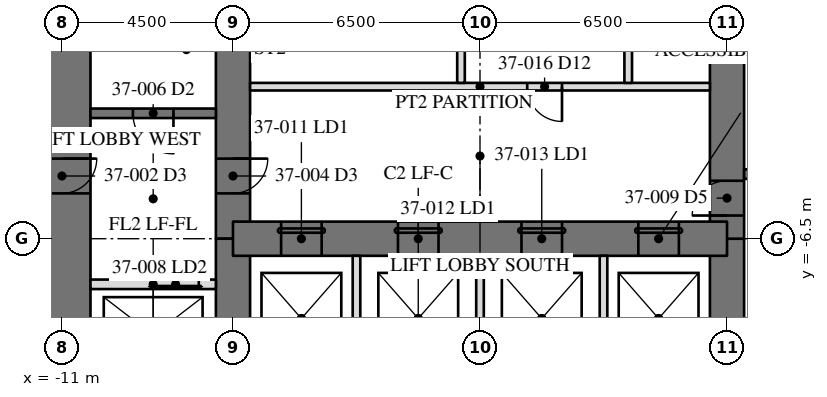
"""IFC4 building model, lengths in metres.
Left out: names, types, materials, properties, quantities, classifications, styles, units other than length and angle.
Written with IfcOpenShell. Run it as: python <this file> out.ifc"""

import sys

from ifc_helpers import new_model, si_unit, direction, frame, frame_2d, origin, place, context, subcontext, project, spatial, rectangle, extrude, element, fill, save


model = new_model("IFC4")
c1 = context("Model", 3, precision=1e-05, world=origin(), true_north=direction((0.0, 1.0)))
c2 = subcontext(c1, "Body", "Model", "MODEL_VIEW")
j1 = project(units=[si_unit("LENGTHUNIT", "METRE"), si_unit("PLANEANGLEUNIT", "RADIAN")], contexts=[c1])
p1 = place(None, origin())
s1 = spatial("IfcSite", under=j1, at=p1, CompositionType="ELEMENT")
p2 = place(p1, origin())
s2 = spatial("IfcBuilding", under=s1, at=p2, CompositionType="ELEMENT")
p3 = place(p2, frame((0.0, 0.0, 158.2)))
s3 = spatial("IfcBuildingStorey", under=s2, at=p3, CompositionType="ELEMENT", Elevation=158.2)
p4 = place(p3, frame((-11.0, 11.0, 0.0), z_axis=(0.0, 0.0, 1.0), x_axis=(0.0, -1.0, 0.0)))
e1 = element("IfcWall", 1, at=p4, inside=s3, PredefinedType="SHEAR", context=c2, shape_type="SweptSolid", body=[
    extrude(rectangle(XDim=22.0, YDim=1.5, at=frame_2d((11.0, 0.0))), origin(), (0.0, 0.0, 1.0), 4.1),
])
p5 = place(p4, frame((15.393, 0.0, 0.0)))
e2 = element("IfcOpeningElement", 2, at=p5, cuts=e1, PredefinedType="OPENING", context=c2, shape_type="SweptSolid", body=[
    extrude(rectangle(XDim=0.915, YDim=2.134, at=frame_2d((0.458, 1.067))), frame((0.0, 0.76, 0.0), z_axis=(0.0, -1.0, 0.0), x_axis=(1.0, 0.0, 0.0)), (0.0, 0.0, 1.0), 1.52),
])
p6 = place(p3, frame((6.5, -11.0, 0.0), z_axis=(0.0, 0.0, 1.0), x_axis=(0.0, 1.0, 0.0)))
e3 = element("IfcWall", 3, at=p6, inside=s3, PredefinedType="SHEAR", context=c2, shape_type="SweptSolid", body=[
    extrude(rectangle(XDim=4.5, YDim=0.9, at=frame_2d((2.25, 0.0))), origin(), (0.0, 0.0, 1.0), 4.1),
])
p7 = place(p3, frame((6.5, -6.5, 0.0), z_axis=(0.0, 0.0, 1.0), x_axis=(0.0, 1.0, 0.0)))
e4 = element("IfcWall", 4, at=p7, inside=s3, PredefinedType="SHEAR", context=c2, shape_type="SweptSolid", body=[
    extrude(rectangle(XDim=13.0, YDim=0.9, at=frame_2d((6.5, 0.0))), origin(), (0.0, 0.0, 1.0), 4.1),
])
p8 = place(p7, frame((10.893, 0.0, 0.0)))
e5 = element("IfcOpeningElement", 5, at=p8, cuts=e4, PredefinedType="OPENING", context=c2, shape_type="SweptSolid", body=[
    extrude(rectangle(XDim=0.915, YDim=2.134, at=frame_2d((0.458, 1.067))), frame((0.0, 0.46, 0.0), z_axis=(0.0, -1.0, 0.0), x_axis=(1.0, 0.0, 0.0)), (0.0, 0.0, 1.0), 0.92),
])
p9 = place(p7, frame((0.61, 0.0, 0.0)))
e6 = element("IfcOpeningElement", 6, at=p9, cuts=e4, PredefinedType="OPENING", context=c2, shape_type="SweptSolid", body=[
    extrude(rectangle(XDim=0.915, YDim=2.134, at=frame_2d((0.458, 1.067))), frame((0.0, 0.46, 0.0), z_axis=(0.0, -1.0, 0.0), x_axis=(1.0, 0.0, 0.0)), (0.0, 0.0, 1.0), 0.92),
])
p10 = place(p3, frame((-6.5, 6.5, 0.0), z_axis=(0.0, 0.0, 1.0), x_axis=(0.0, -1.0, 0.0)))
e7 = element("IfcWall", 7, at=p10, inside=s3, PredefinedType="SHEAR", context=c2, shape_type="SweptSolid", body=[
    extrude(rectangle(XDim=13.0, YDim=0.9, at=frame_2d((6.5, 0.0))), origin(), (0.0, 0.0, 1.0), 4.1),
])
p11 = place(p10, frame((10.893, 0.0, 0.0)))
e8 = element("IfcOpeningElement", 8, at=p11, cuts=e7, PredefinedType="OPENING", context=c2, shape_type="SweptSolid", body=[
    extrude(rectangle(XDim=0.915, YDim=2.134, at=frame_2d((0.458, 1.067))), frame((0.0, 0.46, 0.0), z_axis=(0.0, -1.0, 0.0), x_axis=(1.0, 0.0, 0.0)), (0.0, 0.0, 1.0), 0.92),
])
p12 = place(p10, frame((0.61, 0.0, 0.0)))
e9 = element("IfcOpeningElement", 9, at=p12, cuts=e7, PredefinedType="OPENING", context=c2, shape_type="SweptSolid", body=[
    extrude(rectangle(XDim=0.915, YDim=2.134, at=frame_2d((0.458, 1.067))), frame((0.0, 0.46, 0.0), z_axis=(0.0, -1.0, 0.0), x_axis=(1.0, 0.0, 0.0)), (0.0, 0.0, 1.0), 0.92),
])
p13 = place(p3, frame((-6.5, -6.5, 0.0), z_axis=(0.0, 0.0, 1.0), x_axis=(0.0, -1.0, 0.0)))
e10 = element("IfcWall", 10, at=p13, inside=s3, PredefinedType="SHEAR", context=c2, shape_type="SweptSolid", body=[
    extrude(rectangle(XDim=4.5, YDim=0.9, at=frame_2d((2.25, 0.0))), origin(), (0.0, 0.0, 1.0), 4.1),
])
p14 = place(p3, frame((-6.5, -6.5, 0.0), z_axis=(0.0, 0.0, 1.0), x_axis=(1.0, 0.0, 0.0)))
e11 = element("IfcWall", 11, at=p14, inside=s3, PredefinedType="SHEAR", context=c2, shape_type="SweptSolid", body=[
    extrude(rectangle(XDim=13.0, YDim=0.9, at=frame_2d((6.5, 0.0))), origin(), (0.0, 0.0, 1.0), 4.1),
])
p15 = place(p14, frame((1.267, 0.0, 0.0)))
e12 = element("IfcOpeningElement", 12, at=p15, cuts=e11, PredefinedType="OPENING", context=c2, shape_type="SweptSolid", body=[
    extrude(rectangle(XDim=1.067, YDim=2.134, at=frame_2d((0.533, 1.067))), frame((0.0, 0.46, 0.0), z_axis=(0.0, -1.0, 0.0), x_axis=(1.0, 0.0, 0.0)), (0.0, 0.0, 1.0), 0.92),
])
p16 = place(p14, frame((4.342, 0.0, 0.0)))
e13 = element("IfcOpeningElement", 13, at=p16, cuts=e11, PredefinedType="OPENING", context=c2, shape_type="SweptSolid", body=[
    extrude(rectangle(XDim=1.067, YDim=2.134, at=frame_2d((0.533, 1.067))), frame((0.0, 0.46, 0.0), z_axis=(0.0, -1.0, 0.0), x_axis=(1.0, 0.0, 0.0)), (0.0, 0.0, 1.0), 0.92),
])
p17 = place(p14, frame((7.592, 0.0, 0.0)))
e14 = element("IfcOpeningElement", 14, at=p17, cuts=e11, PredefinedType="OPENING", context=c2, shape_type="SweptSolid", body=[
    extrude(rectangle(XDim=1.067, YDim=2.134, at=frame_2d((0.533, 1.067))), frame((0.0, 0.46, 0.0), z_axis=(0.0, -1.0, 0.0), x_axis=(1.0, 0.0, 0.0)), (0.0, 0.0, 1.0), 0.92),
])
p18 = place(p14, frame((10.667, 0.0, 0.0)))
e15 = element("IfcOpeningElement", 15, at=p18, cuts=e11, PredefinedType="OPENING", context=c2, shape_type="SweptSolid", body=[
    extrude(rectangle(XDim=1.067, YDim=2.134, at=frame_2d((0.533, 1.067))), frame((0.0, 0.46, 0.0), z_axis=(0.0, -1.0, 0.0), x_axis=(1.0, 0.0, 0.0)), (0.0, 0.0, 1.0), 0.92),
])
p19 = place(p3, frame((6.95, -4.8, 0.0), z_axis=(0.0, 0.0, 1.0), x_axis=(1.0, 0.0, 0.0)))
e16 = element("IfcWall", 16, at=p19, inside=s3, PredefinedType="SOLIDWALL", context=c2, shape_type="SweptSolid", body=[
    extrude(rectangle(XDim=3.3, YDim=0.25, at=frame_2d((1.65, 0.0))), origin(), (0.0, 0.0, 1.0), 3.91),
])
p20 = place(p3, frame((-6.95, -3.2, 0.0), z_axis=(0.0, 0.0, 1.0), x_axis=(-1.0, 0.0, 0.0)))
e17 = element("IfcWall", 17, at=p20, inside=s3, PredefinedType="SOLIDWALL", context=c2, shape_type="SweptSolid", body=[
    extrude(rectangle(XDim=3.3, YDim=0.25, at=frame_2d((1.65, 0.0))), origin(), (0.0, 0.0, 1.0), 3.91),
])
p21 = place(p20, frame((1.116, 0.0, 0.0)))
e18 = element("IfcOpeningElement", 18, at=p21, cuts=e17, PredefinedType="OPENING", context=c2, shape_type="SweptSolid", body=[
    extrude(rectangle(XDim=1.067, YDim=2.134, at=frame_2d((0.533, 1.067))), frame((0.0, 0.135, 0.0), z_axis=(0.0, -1.0, 0.0), x_axis=(1.0, 0.0, 0.0)), (0.0, 0.0, 1.0), 0.27),
])
p22 = place(p3, frame((-6.95, -7.7, 0.0), z_axis=(0.0, 0.0, 1.0), x_axis=(-1.0, 0.0, 0.0)))
e19 = element("IfcWall", 19, at=p22, inside=s3, PredefinedType="PARTITIONING", context=c2, shape_type="SweptSolid", body=[
    extrude(rectangle(XDim=3.3, YDim=0.25, at=frame_2d((1.65, 0.0))), origin(), (0.0, 0.0, 1.0), 3.91),
])
p23 = place(p22, frame((0.45, 0.0, 0.0)))
e20 = element("IfcOpeningElement", 20, at=p23, cuts=e19, PredefinedType="OPENING", context=c2, shape_type="SweptSolid", body=[
    extrude(rectangle(XDim=1.219, YDim=2.134, at=frame_2d((0.609, 1.067))), frame((0.0, 0.135, 0.0), z_axis=(0.0, -1.0, 0.0), x_axis=(1.0, 0.0, 0.0)), (0.0, 0.0, 1.0), 0.27),
])
p24 = place(p3, frame((6.05, -2.5, 0.0), z_axis=(0.0, 0.0, 1.0), x_axis=(-1.0, 0.0, 0.0)))
e21 = element("IfcWall", 21, at=p24, inside=s3, PredefinedType="PARTITIONING", context=c2, shape_type="SweptSolid", body=[
    extrude(rectangle(XDim=12.1, YDim=0.2, at=frame_2d((6.05, 0.0))), origin(), (0.0, 0.0, 1.0), 3.91),
])
p25 = place(p24, frame((3.893, 0.0, 0.0)))
e22 = element("IfcOpeningElement", 22, at=p25, cuts=e21, PredefinedType="OPENING", context=c2, shape_type="SweptSolid", body=[
    extrude(rectangle(XDim=0.915, YDim=2.134, at=frame_2d((0.458, 1.067))), frame((0.0, 0.11, 0.0), z_axis=(0.0, -1.0, 0.0), x_axis=(1.0, 0.0, 0.0)), (0.0, 0.0, 1.0), 0.22),
])
for number, where, z_axis, x_axis in (
    (23, (-3.25, -10.25, 0.0), (0.0, 0.0, 1.0), (0.0, 1.0, 0.0)),
    (24, (0.0, -10.25, 0.0), (0.0, 0.0, 1.0), (0.0, 1.0, 0.0)),
    (25, (3.25, -10.25, 0.0), (0.0, 0.0, 1.0), (0.0, 1.0, 0.0)),
):
    element("IfcWall", number, at=place(p3, frame(where, z_axis=z_axis, x_axis=x_axis)), inside=s3, PredefinedType="PARTITIONING", context=c2, shape_type="SweptSolid", body=[
        extrude(rectangle(XDim=3.3, YDim=0.2, at=frame_2d((1.65, 0.0))), origin(), (0.0, 0.0, 1.0), 3.91),
    ])
for number, where, z_axis, x_axis in (
    (26, (-0.5, -2.4, 0.0), (0.0, 0.0, 1.0), (0.0, 1.0, 0.0)),
    (27, (3.9, -2.4, 0.0), (0.0, 0.0, 1.0), (0.0, 1.0, 0.0)),
):
    element("IfcWall", number, at=place(p3, frame(where, z_axis=z_axis, x_axis=x_axis)), inside=s3, PredefinedType="PARTITIONING", context=c2, shape_type="SweptSolid", body=[
        extrude(rectangle(XDim=4.8, YDim=0.2, at=frame_2d((2.4, 0.0))), origin(), (0.0, 0.0, 1.0), 3.91),
    ])
p26 = place(p11, origin())
e28 = element("IfcDoor", 28, at=p26, inside=s3, OperationType="SINGLE_SWING_RIGHT", PredefinedType="DOOR", context=c2, shape_type="SweptSolid", body=[
    extrude(rectangle(XDim=0.915, YDim=2.134, at=frame_2d((0.458, 1.067))), frame((0.0, -0.375, 0.0), z_axis=(0.0, -1.0, 0.0), x_axis=(1.0, 0.0, 0.0)), (0.0, 0.0, 1.0), 0.05),
])
fill(e8, e28)
p27 = place(p21, origin())
e29 = element("IfcDoor", 29, at=p27, inside=s3, OperationType="SINGLE_SWING_LEFT", PredefinedType="DOOR", context=c2, shape_type="SweptSolid", body=[
    extrude(rectangle(XDim=1.067, YDim=2.134, at=frame_2d((0.533, 1.067))), frame((0.0, 0.025, 0.0), z_axis=(0.0, -1.0, 0.0), x_axis=(1.0, 0.0, 0.0)), (0.0, 0.0, 1.0), 0.05),
])
fill(e18, e29)
p28 = place(p23, origin())
e30 = element("IfcDoor", 30, at=p28, inside=s3, OperationType="SLIDING_TO_LEFT", PredefinedType="DOOR", context=c2, shape_type="SweptSolid", body=[
    extrude(rectangle(XDim=1.219, YDim=2.134, at=frame_2d((0.609, 1.067))), frame((0.0, 0.025, 0.0), z_axis=(0.0, -1.0, 0.0), x_axis=(1.0, 0.0, 0.0)), (0.0, 0.0, 1.0), 0.05),
])
fill(e20, e30)
p29 = place(p9, origin())
e31 = element("IfcDoor", 31, at=p29, inside=s3, OperationType="SINGLE_SWING_RIGHT", PredefinedType="DOOR", context=c2, shape_type="SweptSolid", body=[
    extrude(rectangle(XDim=0.915, YDim=2.134, at=frame_2d((0.458, 1.067))), frame((0.0, -0.375, 0.0), z_axis=(0.0, -1.0, 0.0), x_axis=(1.0, 0.0, 0.0)), (0.0, 0.0, 1.0), 0.05),
])
fill(e6, e31)
p30 = place(p15, origin())
e32 = element("IfcDoor", 32, at=p30, inside=s3, OperationType="SLIDING_TO_LEFT", PredefinedType="DOOR", context=c2, shape_type="SweptSolid", body=[
    extrude(rectangle(XDim=1.067, YDim=2.134, at=frame_2d((0.533, 1.067))), frame((0.0, -0.375, 0.0), z_axis=(0.0, -1.0, 0.0), x_axis=(1.0, 0.0, 0.0)), (0.0, 0.0, 1.0), 0.05),
])
fill(e12, e32)
p31 = place(p16, origin())
e33 = element("IfcDoor", 33, at=p31, inside=s3, OperationType="SLIDING_TO_LEFT", PredefinedType="DOOR", context=c2, shape_type="SweptSolid", body=[
    extrude(rectangle(XDim=1.067, YDim=2.134, at=frame_2d((0.533, 1.067))), frame((0.0, -0.375, 0.0), z_axis=(0.0, -1.0, 0.0), x_axis=(1.0, 0.0, 0.0)), (0.0, 0.0, 1.0), 0.05),
])
fill(e13, e33)
p32 = place(p17, origin())
e34 = element("IfcDoor", 34, at=p32, inside=s3, OperationType="SLIDING_TO_LEFT", PredefinedType="DOOR", context=c2, shape_type="SweptSolid", body=[
    extrude(rectangle(XDim=1.067, YDim=2.134, at=frame_2d((0.533, 1.067))), frame((0.0, -0.375, 0.0), z_axis=(0.0, -1.0, 0.0), x_axis=(1.0, 0.0, 0.0)), (0.0, 0.0, 1.0), 0.05),
])
fill(e14, e34)
p33 = place(p18, origin())
e35 = element("IfcDoor", 35, at=p33, inside=s3, OperationType="SLIDING_TO_LEFT", PredefinedType="DOOR", context=c2, shape_type="SweptSolid", body=[
    extrude(rectangle(XDim=1.067, YDim=2.134, at=frame_2d((0.533, 1.067))), frame((0.0, -0.375, 0.0), z_axis=(0.0, -1.0, 0.0), x_axis=(1.0, 0.0, 0.0)), (0.0, 0.0, 1.0), 0.05),
])
fill(e15, e35)
p34 = place(p25, origin())
e36 = element("IfcDoor", 36, at=p34, inside=s3, OperationType="SINGLE_SWING_LEFT", PredefinedType="DOOR", context=c2, shape_type="SweptSolid", body=[
    extrude(rectangle(XDim=0.915, YDim=2.134, at=frame_2d((0.458, 1.067))), frame((0.0, 0.025, 0.0), z_axis=(0.0, -1.0, 0.0), x_axis=(1.0, 0.0, 0.0)), (0.0, 0.0, 1.0), 0.05),
])
fill(e22, e36)
save(model, sys.argv[1])
